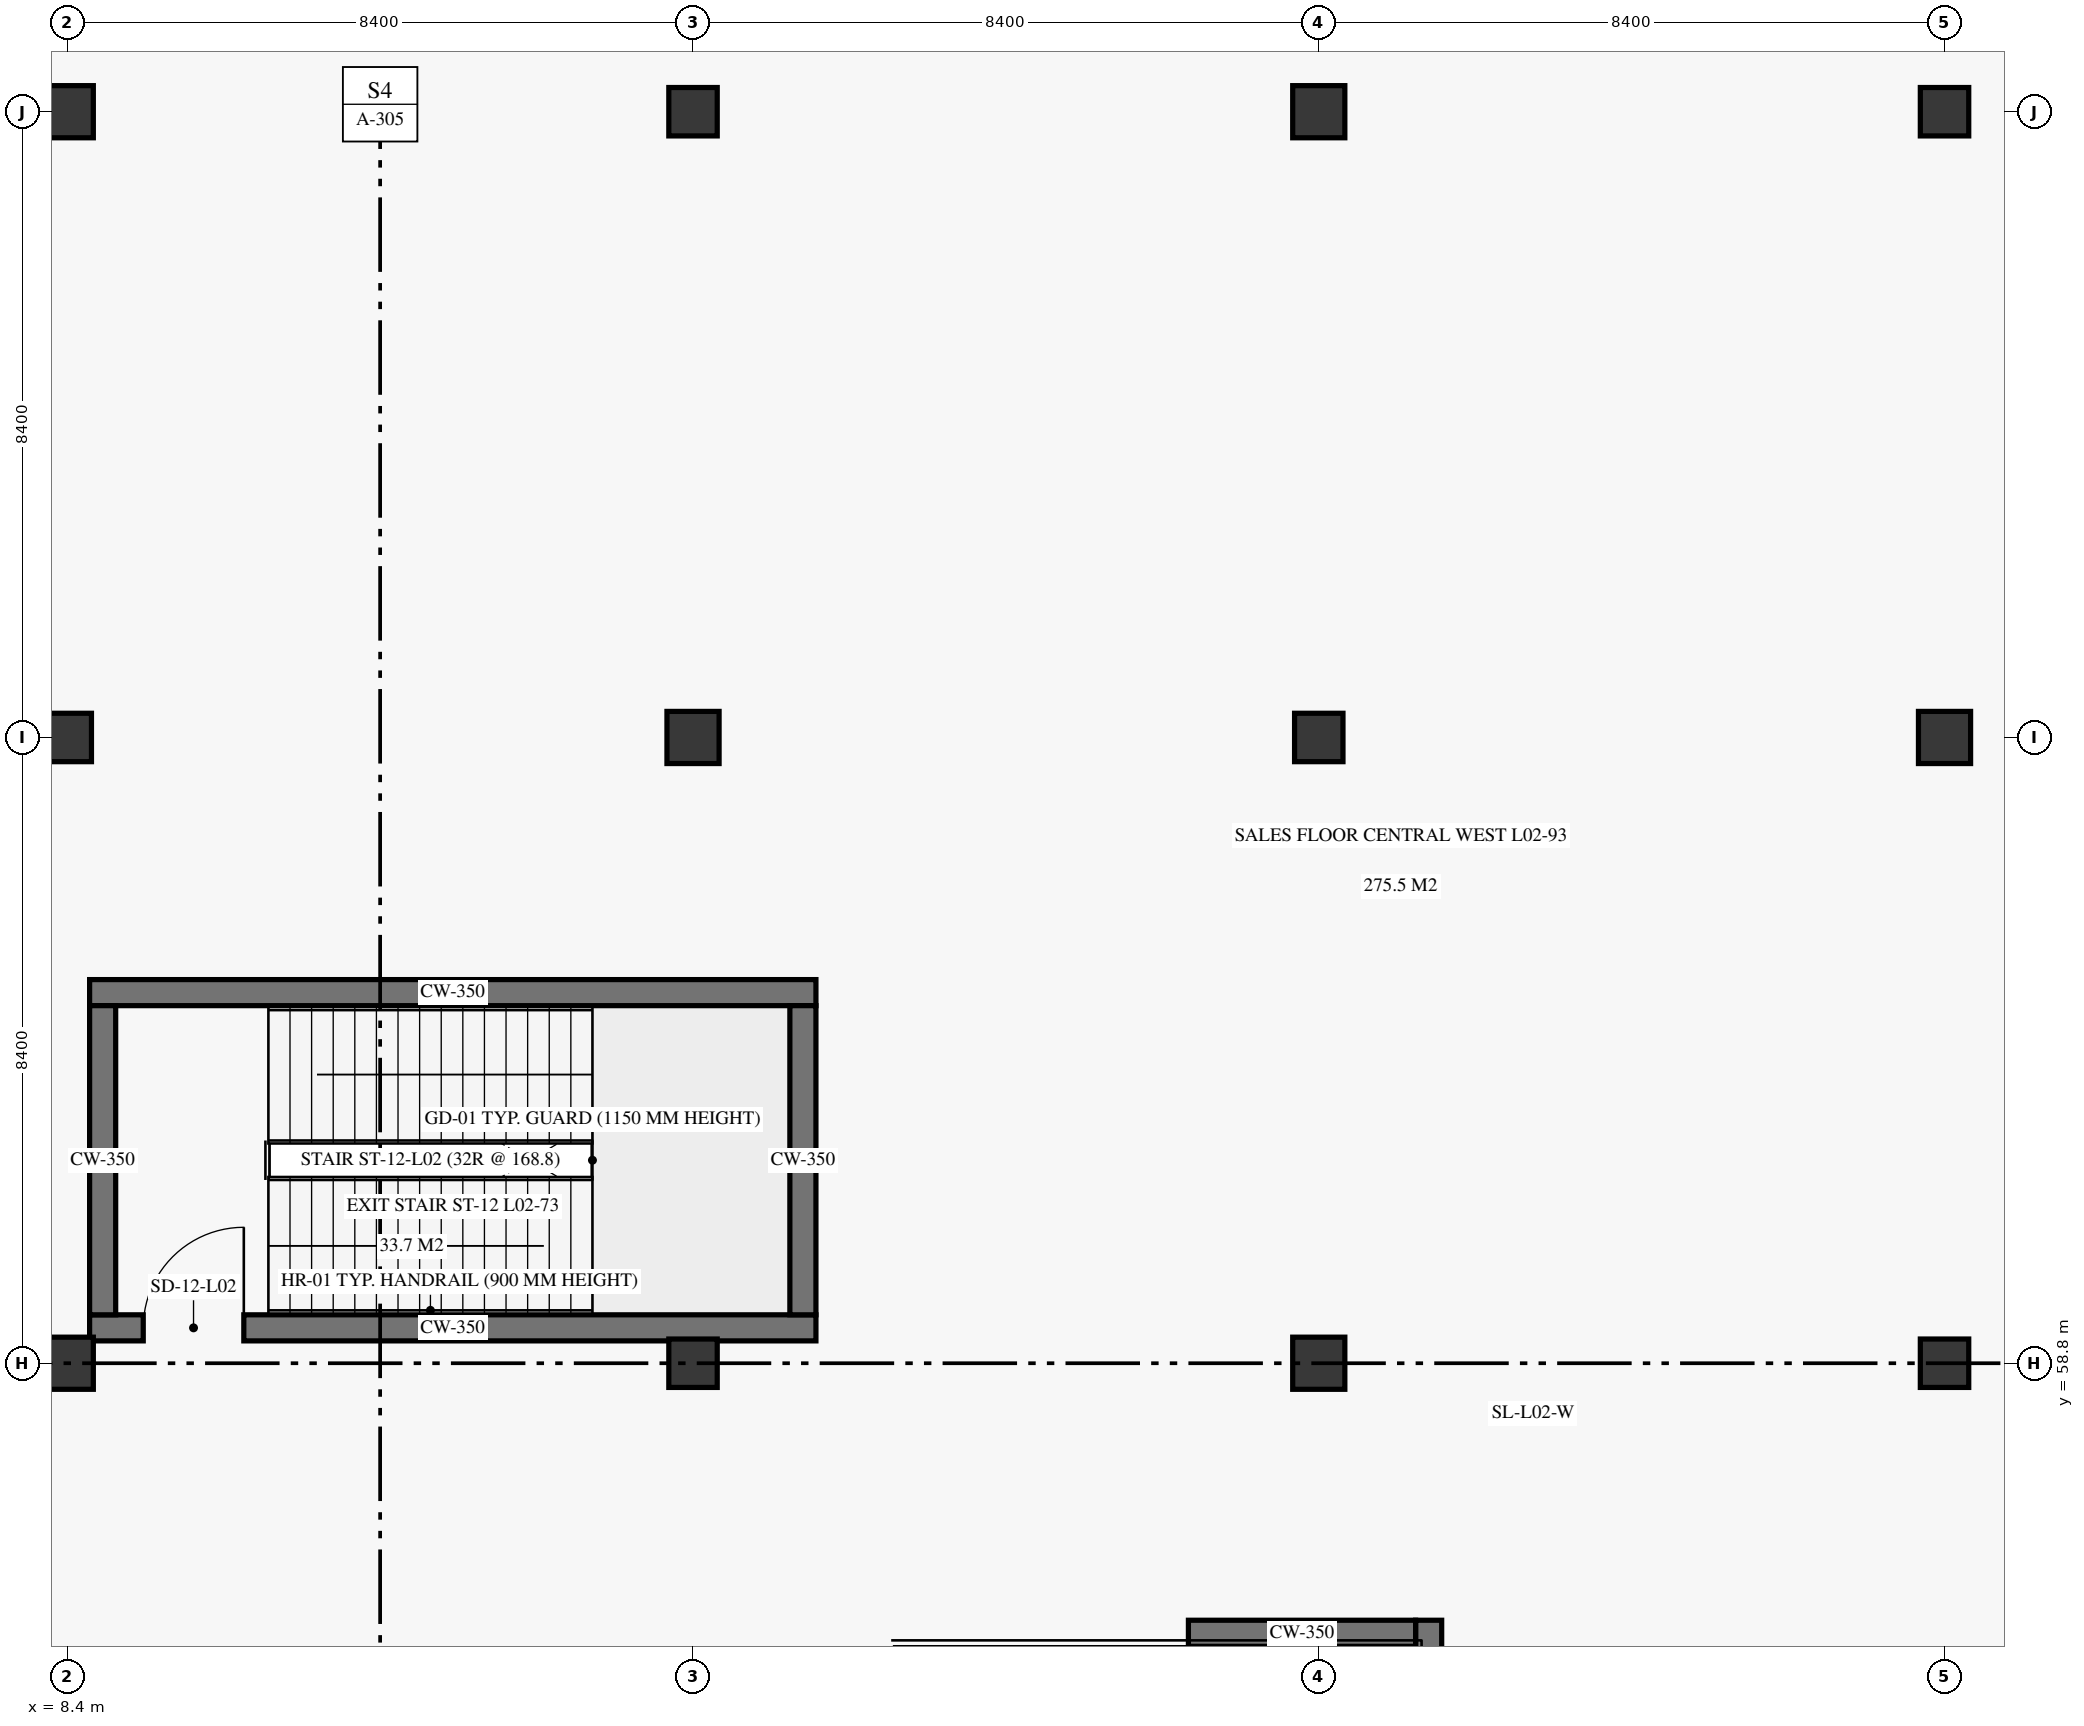
"""IFC4 building model, lengths in metres.
Left out: names, types, materials, properties, quantities, classifications, styles, units other than length and angle.
Written with IfcOpenShell. Run it as: python <this file> out.ifc"""

import sys

from ifc_helpers import new_model, si_unit, direction, frame, frame_2d, origin, origin_2d, place, context, subcontext, project, spatial, rectangle, extrude, element, fill, save


model = new_model("IFC4")
c1 = context("Model", 3, precision=1e-05, world=origin(), true_north=direction((0.0, 1.0)))
c2 = subcontext(c1, "Body", "Model", "MODEL_VIEW")
j1 = project(units=[si_unit("LENGTHUNIT", "METRE"), si_unit("PLANEANGLEUNIT", "RADIAN")], contexts=[c1])
p1 = place(None, origin())
s1 = spatial("IfcSite", under=j1, at=p1, CompositionType="ELEMENT")
p2 = place(p1, origin())
s2 = spatial("IfcBuilding", under=s1, at=p2, CompositionType="ELEMENT")
p3 = place(p2, frame((0.0, 0.0, 6.0)))
s3 = spatial("IfcBuildingStorey", under=s2, at=p3, CompositionType="ELEMENT", Elevation=6.0)
p4 = place(p3, frame((8.4, 58.8, 0.0), z_axis=(0.0, 0.0, 1.0), x_axis=(1.0, 0.0, 0.0)))
e1 = element("IfcColumn", 1, at=p4, inside=s3, PredefinedType="COLUMN", context=c2, shape_type="SweptSolid", body=[
    extrude(rectangle(XDim=0.7, YDim=0.7, at=origin_2d()), origin(), (0.0, 0.0, 1.0), 5.1),
])
p5 = place(p3, frame((8.4, 67.2, 0.0), z_axis=(0.0, 0.0, 1.0), x_axis=(1.0, 0.0, 0.0)))
e2 = element("IfcColumn", 2, at=p5, inside=s3, PredefinedType="COLUMN", context=c2, shape_type="SweptSolid", body=[
    extrude(rectangle(XDim=0.65, YDim=0.65, at=origin_2d()), origin(), (0.0, 0.0, 1.0), 5.1),
])
p6 = place(p3, frame((8.4, 75.6, 0.0), z_axis=(0.0, 0.0, 1.0), x_axis=(1.0, 0.0, 0.0)))
e3 = element("IfcColumn", 3, at=p6, inside=s3, PredefinedType="COLUMN", context=c2, shape_type="SweptSolid", body=[
    extrude(rectangle(XDim=0.7, YDim=0.7, at=origin_2d()), origin(), (0.0, 0.0, 1.0), 5.1),
])
p7 = place(p3, frame((16.8, 58.8, 0.0), z_axis=(0.0, 0.0, 1.0), x_axis=(1.0, 0.0, 0.0)))
e4 = element("IfcColumn", 4, at=p7, inside=s3, PredefinedType="COLUMN", context=c2, shape_type="SweptSolid", body=[
    extrude(rectangle(XDim=0.65, YDim=0.65, at=origin_2d()), origin(), (0.0, 0.0, 1.0), 5.1),
])
p8 = place(p3, frame((16.8, 67.2, 0.0), z_axis=(0.0, 0.0, 1.0), x_axis=(1.0, 0.0, 0.0)))
e5 = element("IfcColumn", 5, at=p8, inside=s3, PredefinedType="COLUMN", context=c2, shape_type="SweptSolid", body=[
    extrude(rectangle(XDim=0.7, YDim=0.7, at=origin_2d()), origin(), (0.0, 0.0, 1.0), 5.1),
])
p9 = place(p3, frame((16.8, 75.6, 0.0), z_axis=(0.0, 0.0, 1.0), x_axis=(1.0, 0.0, 0.0)))
e6 = element("IfcColumn", 6, at=p9, inside=s3, PredefinedType="COLUMN", context=c2, shape_type="SweptSolid", body=[
    extrude(rectangle(XDim=0.65, YDim=0.65, at=origin_2d()), origin(), (0.0, 0.0, 1.0), 5.1),
])
p10 = place(p3, frame((25.2, 58.8, 0.0), z_axis=(0.0, 0.0, 1.0), x_axis=(1.0, 0.0, 0.0)))
e7 = element("IfcColumn", 7, at=p10, inside=s3, PredefinedType="COLUMN", context=c2, shape_type="SweptSolid", body=[
    extrude(rectangle(XDim=0.7, YDim=0.7, at=origin_2d()), origin(), (0.0, 0.0, 1.0), 5.1),
])
p11 = place(p3, frame((25.2, 67.2, 0.0), z_axis=(0.0, 0.0, 1.0), x_axis=(1.0, 0.0, 0.0)))
e8 = element("IfcColumn", 8, at=p11, inside=s3, PredefinedType="COLUMN", context=c2, shape_type="SweptSolid", body=[
    extrude(rectangle(XDim=0.65, YDim=0.65, at=origin_2d()), origin(), (0.0, 0.0, 1.0), 5.1),
])
p12 = place(p3, frame((25.2, 75.6, 0.0), z_axis=(0.0, 0.0, 1.0), x_axis=(1.0, 0.0, 0.0)))
e9 = element("IfcColumn", 9, at=p12, inside=s3, PredefinedType="COLUMN", context=c2, shape_type="SweptSolid", body=[
    extrude(rectangle(XDim=0.7, YDim=0.7, at=origin_2d()), origin(), (0.0, 0.0, 1.0), 5.1),
])
p13 = place(p3, frame((33.6, 58.8, 0.0), z_axis=(0.0, 0.0, 1.0), x_axis=(1.0, 0.0, 0.0)))
e10 = element("IfcColumn", 10, at=p13, inside=s3, PredefinedType="COLUMN", context=c2, shape_type="SweptSolid", body=[
    extrude(rectangle(XDim=0.65, YDim=0.65, at=origin_2d()), origin(), (0.0, 0.0, 1.0), 5.1),
])
p14 = place(p3, frame((33.6, 67.2, 0.0), z_axis=(0.0, 0.0, 1.0), x_axis=(1.0, 0.0, 0.0)))
e11 = element("IfcColumn", 11, at=p14, inside=s3, PredefinedType="COLUMN", context=c2, shape_type="SweptSolid", body=[
    extrude(rectangle(XDim=0.7, YDim=0.7, at=origin_2d()), origin(), (0.0, 0.0, 1.0), 5.1),
])
p15 = place(p3, frame((33.6, 75.6, 0.0), z_axis=(0.0, 0.0, 1.0), x_axis=(1.0, 0.0, 0.0)))
e12 = element("IfcColumn", 12, at=p15, inside=s3, PredefinedType="COLUMN", context=c2, shape_type="SweptSolid", body=[
    extrude(rectangle(XDim=0.65, YDim=0.65, at=origin_2d()), origin(), (0.0, 0.0, 1.0), 5.1),
])
p16 = place(p3, frame((8.7, 59.275, 0.0), z_axis=(0.0, 0.0, 1.0), x_axis=(1.0, 0.0, 0.0)))
e13 = element("IfcWall", 13, at=p16, inside=s3, PredefinedType="SHEAR", context=c2, shape_type="SweptSolid", body=[
    extrude(rectangle(XDim=9.75, YDim=0.35, at=frame_2d((4.875, 0.0))), origin(), (0.0, 0.0, 1.0), 5.1),
])
p17 = place(p16, frame((0.72, 0.0, 0.0)))
e14 = element("IfcOpeningElement", 14, at=p17, cuts=e13, PredefinedType="OPENING", context=c2, shape_type="SweptSolid", body=[
    extrude(rectangle(XDim=1.35, YDim=2.25, at=frame_2d((0.675, 1.125))), frame((0.0, 0.185, 0.0), z_axis=(0.0, -1.0, 0.0), x_axis=(1.0, 0.0, 0.0)), (0.0, 0.0, 1.0), 0.37),
])
p18 = place(p3, frame((8.7, 63.775, 0.0), z_axis=(0.0, 0.0, 1.0), x_axis=(1.0, 0.0, 0.0)))
e15 = element("IfcWall", 15, at=p18, inside=s3, PredefinedType="SHEAR", context=c2, shape_type="SweptSolid", body=[
    extrude(rectangle(XDim=9.75, YDim=0.35, at=frame_2d((4.875, 0.0))), origin(), (0.0, 0.0, 1.0), 5.1),
])
for number, where, z_axis, x_axis in (
    (16, (8.875, 59.45, 0.0), (0.0, 0.0, 1.0), (0.0, 1.0, 0.0)),
    (17, (18.275, 59.45, 0.0), (0.0, 0.0, 1.0), (0.0, 1.0, 0.0)),
):
    element("IfcWall", number, at=place(p3, frame(where, z_axis=z_axis, x_axis=x_axis)), inside=s3, PredefinedType="SHEAR", context=c2, shape_type="SweptSolid", body=[
        extrude(rectangle(XDim=4.15, YDim=0.35, at=frame_2d((2.075, 0.0))), origin(), (0.0, 0.0, 1.0), 5.1),
    ])
p19 = place(p3, frame((26.675, 50.7, 0.0), z_axis=(0.0, 0.0, 1.0), x_axis=(0.0, 1.0, 0.0)))
e18 = element("IfcWall", 18, at=p19, inside=s3, PredefinedType="SHEAR", context=c2, shape_type="SweptSolid", body=[
    extrude(rectangle(XDim=4.65, YDim=0.35, at=frame_2d((2.325, 0.0))), origin(), (0.0, 0.0, 1.0), 5.1),
])
p20 = place(p3, frame((23.45, 55.175, 0.0), z_axis=(0.0, 0.0, 1.0), x_axis=(1.0, 0.0, 0.0)))
e19 = element("IfcWall", 19, at=p20, inside=s3, PredefinedType="SHEAR", context=c2, shape_type="SweptSolid", body=[
    extrude(rectangle(XDim=3.05, YDim=0.35, at=frame_2d((1.525, 0.0))), origin(), (0.0, 0.0, 1.0), 5.1),
])
p21 = place(p17, origin())
e20 = element("IfcDoor", 20, at=p21, inside=s3, OperationType="SINGLE_SWING_RIGHT", PredefinedType="DOOR", context=c2, shape_type="SweptSolid", body=[
    extrude(rectangle(XDim=1.35, YDim=2.25, at=frame_2d((0.675, 1.125))), frame((0.0, 0.025, 0.0), z_axis=(0.0, -1.0, 0.0), x_axis=(1.0, 0.0, 0.0)), (0.0, 0.0, 1.0), 0.05),
])
fill(e14, e20)
save(model, sys.argv[1])
